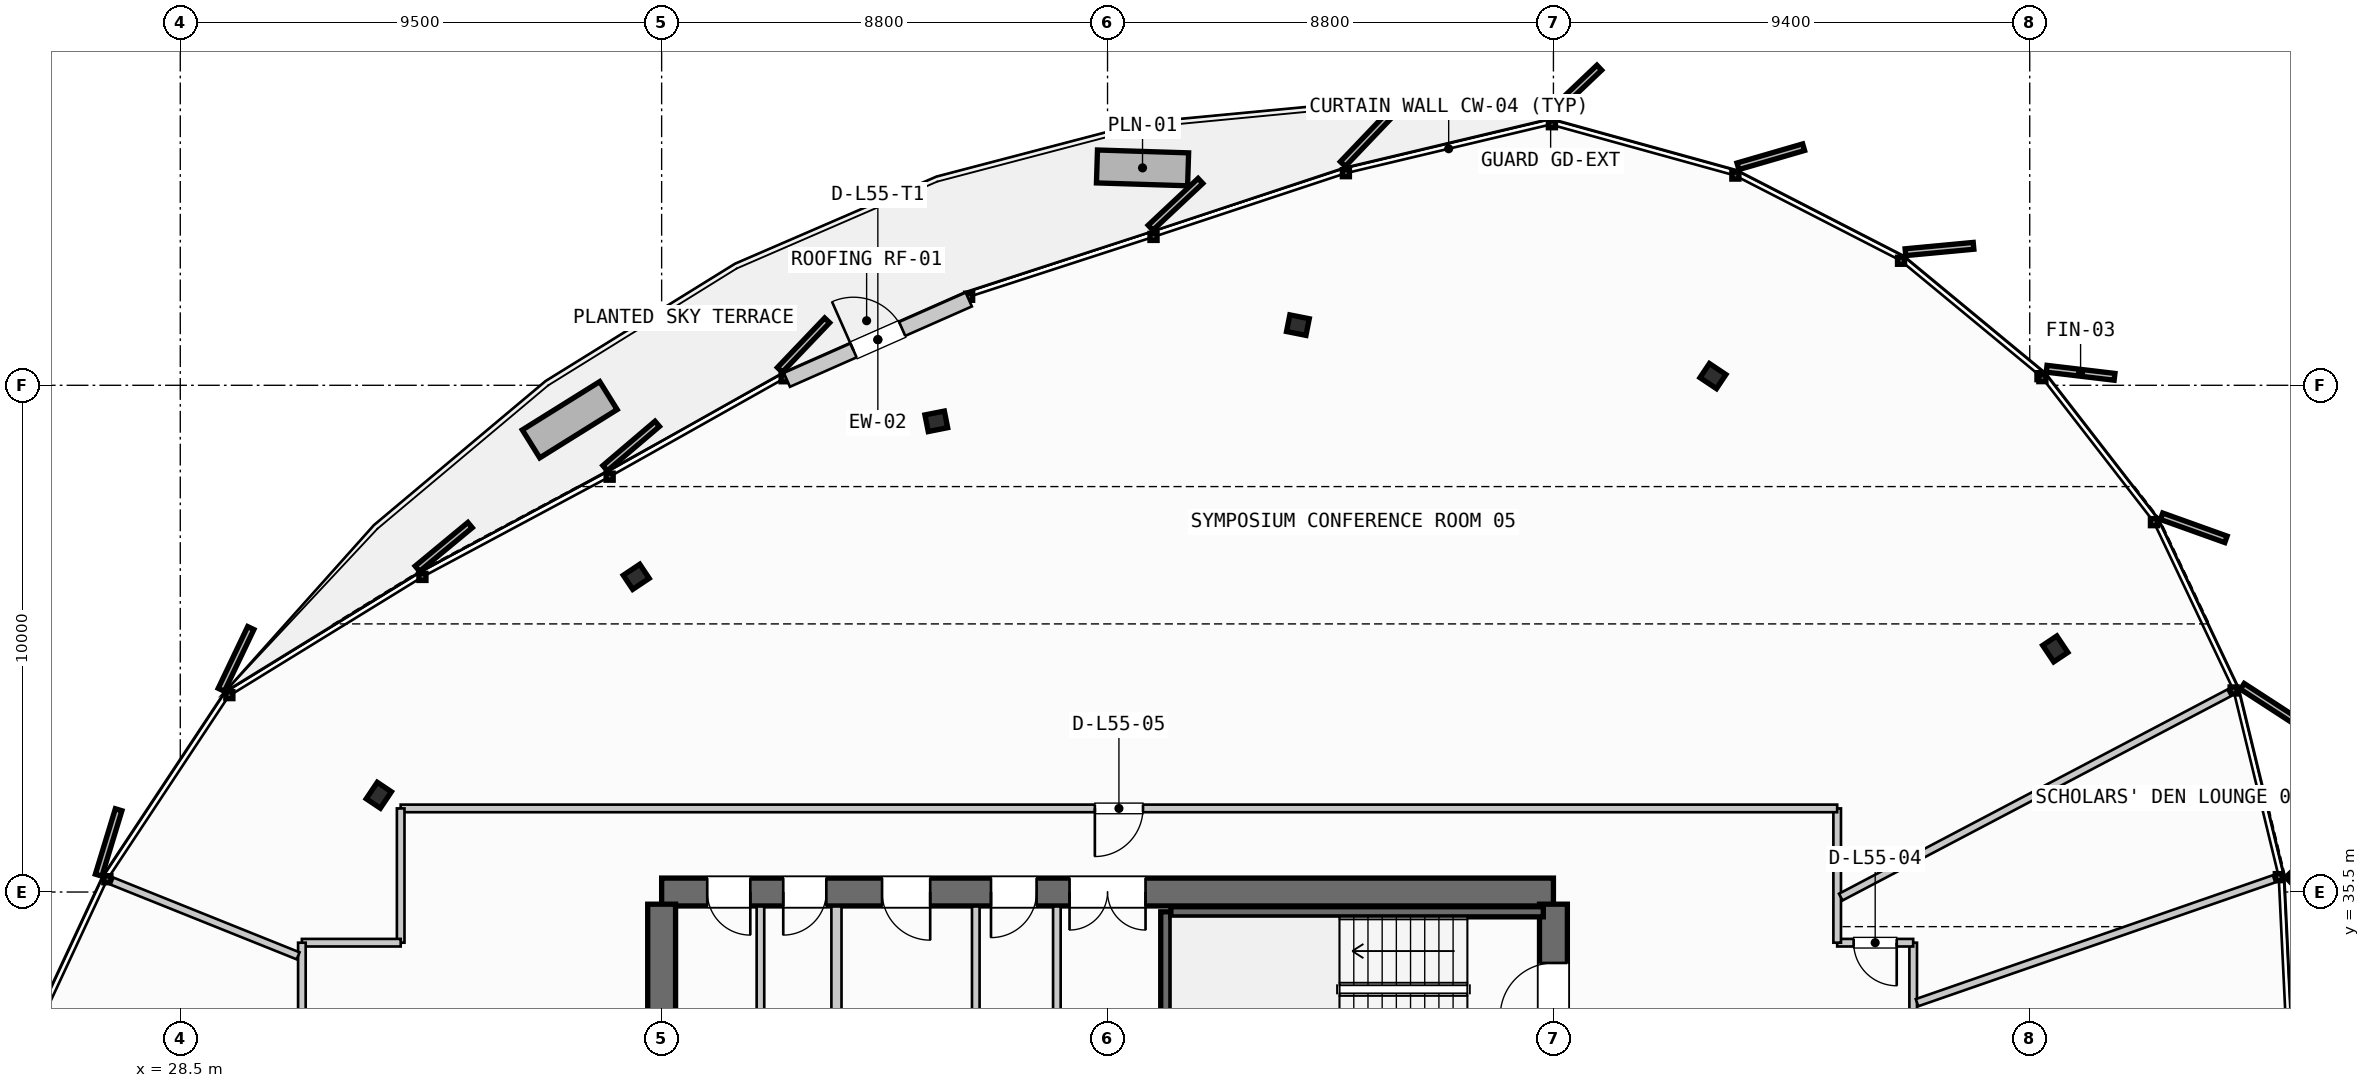
"""IFC4 building model, lengths in metres.
Left out: names, types, materials, properties, quantities, classifications, styles, units other than length and angle.
Written with IfcOpenShell. Run it as: python <this file> out.ifc"""

import sys

from ifc_helpers import new_model, si_unit, direction, frame, frame_2d, origin, origin_2d, place, context, subcontext, project, spatial, rectangle, i_section, extrude, source, transform, mapped, element, fill, save


model = new_model("IFC4")
c1 = context("Model", 3, precision=1e-05, world=origin(), true_north=direction((0.0, 1.0)))
c2 = subcontext(c1, "Body", "Model", "MODEL_VIEW")
j1 = project(units=[si_unit("LENGTHUNIT", "METRE"), si_unit("PLANEANGLEUNIT", "RADIAN")], contexts=[c1])
p1 = place(None, origin())
s1 = spatial("IfcSite", under=j1, at=p1, CompositionType="ELEMENT")
p2 = place(p1, origin())
s2 = spatial("IfcBuilding", under=s1, at=p2, CompositionType="ELEMENT")
p3 = place(p2, frame((0.0, 0.0, 211.4)))
s3 = spatial("IfcBuildingStorey", under=s2, at=p3, CompositionType="ELEMENT", Elevation=211.4)
p4 = place(p3, frame((55.6, 35.5, 0.0), z_axis=(0.0, 0.0, 1.0), x_axis=(-1.0, 0.0, 0.0)))
e1 = element("IfcWall", 1, at=p4, inside=s3, PredefinedType="SHEAR", context=c2, shape_type="SweptSolid", body=[
    extrude(rectangle(XDim=17.6, YDim=0.55, at=frame_2d((8.8, 0.0))), origin(), (0.0, 0.0, 1.0), 3.26),
])
p5 = place(p4, frame((8.05, 0.0, 0.0)))
e2 = element("IfcOpeningElement", 2, at=p5, cuts=e1, PredefinedType="OPENING", context=c2, shape_type="SweptSolid", body=[
    extrude(rectangle(XDim=1.5, YDim=2.2, at=frame_2d((0.75, 1.1))), frame((0.0, 0.285, 0.0), z_axis=(0.0, -1.0, 0.0), x_axis=(1.0, 0.0, 0.0)), (0.0, 0.0, 1.0), 0.57),
])
p6 = place(p4, frame((15.85, 0.0, 0.0)))
e3 = element("IfcOpeningElement", 3, at=p6, cuts=e1, PredefinedType="OPENING", context=c2, shape_type="SweptSolid", body=[
    extrude(rectangle(XDim=0.85, YDim=2.15, at=frame_2d((0.425, 1.075))), frame((0.0, 0.285, 0.0), z_axis=(0.0, -1.0, 0.0), x_axis=(1.0, 0.0, 0.0)), (0.0, 0.0, 1.0), 0.57),
])
p7 = place(p4, frame((14.35, 0.0, 0.0)))
e4 = element("IfcOpeningElement", 4, at=p7, cuts=e1, PredefinedType="OPENING", context=c2, shape_type="SweptSolid", body=[
    extrude(rectangle(XDim=0.85, YDim=2.15, at=frame_2d((0.425, 1.075))), frame((0.0, 0.285, 0.0), z_axis=(0.0, -1.0, 0.0), x_axis=(1.0, 0.0, 0.0)), (0.0, 0.0, 1.0), 0.57),
])
p8 = place(p4, frame((12.3, 0.0, 0.0)))
e5 = element("IfcOpeningElement", 5, at=p8, cuts=e1, PredefinedType="OPENING", context=c2, shape_type="SweptSolid", body=[
    extrude(rectangle(XDim=0.95, YDim=2.15, at=frame_2d((0.475, 1.075))), frame((0.0, 0.285, 0.0), z_axis=(0.0, -1.0, 0.0), x_axis=(1.0, 0.0, 0.0)), (0.0, 0.0, 1.0), 0.57),
])
p9 = place(p4, frame((10.2, 0.0, 0.0)))
e6 = element("IfcOpeningElement", 6, at=p9, cuts=e1, PredefinedType="OPENING", context=c2, shape_type="SweptSolid", body=[
    extrude(rectangle(XDim=0.9, YDim=2.15, at=frame_2d((0.45, 1.075))), frame((0.0, 0.285, 0.0), z_axis=(0.0, -1.0, 0.0), x_axis=(1.0, 0.0, 0.0)), (0.0, 0.0, 1.0), 0.57),
])
p10 = place(p3, frame((38.0, 35.26, 0.0), z_axis=(0.0, 0.0, 1.0), x_axis=(0.0, -1.0, 0.0)))
e7 = element("IfcWall", 7, at=p10, inside=s3, PredefinedType="SHEAR", context=c2, shape_type="SweptSolid", body=[
    extrude(rectangle(XDim=14.92, YDim=0.55, at=frame_2d((7.46, 0.0))), origin(), (0.0, 0.0, 1.0), 3.26),
])
p11 = place(p10, frame((5.21, 0.0, 0.0)))
e8 = element("IfcOpeningElement", 8, at=p11, cuts=e7, PredefinedType="OPENING", context=c2, shape_type="SweptSolid", body=[
    extrude(rectangle(XDim=1.1, YDim=2.2, at=frame_2d((0.55, 1.1))), frame((0.0, 0.285, 0.0), z_axis=(0.0, -1.0, 0.0), x_axis=(1.0, 0.0, 0.0)), (0.0, 0.0, 1.0), 0.57),
])
p12 = place(p3, frame((55.6, 20.34, 0.0), z_axis=(0.0, 0.0, 1.0), x_axis=(0.0, 1.0, 0.0)))
e9 = element("IfcWall", 9, at=p12, inside=s3, PredefinedType="SHEAR", context=c2, shape_type="SweptSolid", body=[
    extrude(rectangle(XDim=14.92, YDim=0.55, at=frame_2d((7.46, 0.0))), origin(), (0.0, 0.0, 1.0), 3.26),
])
p13 = place(p12, frame((12.71, 0.0, 0.0)))
e10 = element("IfcOpeningElement", 10, at=p13, cuts=e9, PredefinedType="OPENING", context=c2, shape_type="SweptSolid", body=[
    extrude(rectangle(XDim=1.05, YDim=2.15, at=frame_2d((0.525, 1.075))), frame((0.0, 0.285, 0.0), z_axis=(0.0, -1.0, 0.0), x_axis=(1.0, 0.0, 0.0)), (0.0, 0.0, 1.0), 0.57),
])
p14 = place(p12, frame((8.61, 0.0, 0.0)))
e11 = element("IfcOpeningElement", 11, at=p14, cuts=e9, PredefinedType="OPENING", context=c2, shape_type="SweptSolid", body=[
    extrude(rectangle(XDim=1.1, YDim=2.2, at=frame_2d((0.55, 1.1))), frame((0.0, 0.285, 0.0), z_axis=(0.0, -1.0, 0.0), x_axis=(1.0, 0.0, 0.0)), (0.0, 0.0, 1.0), 0.57),
])
m1 = source(origin(), c2, "Body", "SweptSolid", [
    extrude(i_section(OverallWidth=0.391, OverallDepth=0.335, WebThickness=0.023, FlangeThickness=0.034, FilletRadius=0.015, at=origin_2d()), origin(), (0.0, 0.0, 1.0), 3.26),
])
for number, where, z_axis, x_axis in (
    (12, (65.504, 40.298, 0.0), (0.0, 0.0, 1.0), (0.831, 0.556, 0.0)),
    (13, (58.748, 45.681, 0.0), (0.0, 0.0, 1.0), (0.556, 0.831, 0.0)),
    (14, (50.557, 46.688, 0.0), (0.0, 0.0, 1.0), (0.195, 0.981, 0.0)),
    (15, (43.421, 44.789, 0.0), (0.0, 0.0, 1.0), (-0.195, 0.981, 0.0)),
    (16, (37.499, 41.72, 0.0), (0.0, 0.0, 1.0), (-0.556, 0.831, 0.0)),
    (17, (32.418, 37.409, 0.0), (0.0, 0.0, 1.0), (-0.831, 0.556, 0.0)),
):
    element("IfcColumn", number, at=place(p3, frame(where, z_axis=z_axis, x_axis=x_axis)), inside=s3, PredefinedType="COLUMN", context=c2, shape_type="MappedRepresentation", body=[
        mapped(m1, transform((0.0, 0.0, 0.0), scale=1.0)),
    ])
p15 = place(p3, frame((40.472, 45.608, 0.0), z_axis=(0.0, 0.0, 1.0), x_axis=(0.914758259642, 0.404001641602, 0.0)))
e18 = element("IfcWall", 18, at=p15, inside=s3, PredefinedType="SOLIDWALL", context=c2, shape_type="SweptSolid", body=[
    extrude(rectangle(XDim=3.924, YDim=0.3, at=frame_2d((1.962, 0.0))), origin(), (0.0, 0.0, 1.0), 2.735),
])
p16 = place(p15, frame((1.437, 0.0, 0.0)))
e19 = element("IfcOpeningElement", 19, at=p16, cuts=e18, PredefinedType="OPENING", context=c2, shape_type="SweptSolid", body=[
    extrude(rectangle(XDim=1.05, YDim=2.2, at=frame_2d((0.525, 1.1))), frame((0.0, 0.16, 0.0), z_axis=(0.0, -1.0, 0.0), x_axis=(1.0, 0.0, 0.0)), (0.0, 0.0, 1.0), 0.32),
])
p17 = place(p3, frame((47.95, 32.05, 0.0), z_axis=(0.0, 0.0, 1.0), x_axis=(0.0, 1.0, 0.0)))
e20 = element("IfcWall", 20, at=p17, inside=s3, PredefinedType="SHEAR", context=c2, shape_type="SweptSolid", body=[
    extrude(rectangle(XDim=3.06, YDim=0.2, at=frame_2d((1.53, 0.0))), origin(), (0.0, 0.0, 1.0), 3.26),
])
p18 = place(p3, frame((48.05, 35.11, 0.0), z_axis=(0.0, 0.0, 1.0), x_axis=(1.0, 0.0, 0.0)))
e21 = element("IfcWall", 21, at=p18, inside=s3, PredefinedType="SHEAR", context=c2, shape_type="SweptSolid", body=[
    extrude(rectangle(XDim=7.35, YDim=0.2, at=frame_2d((3.675, 0.0))), origin(), (0.0, 0.0, 1.0), 3.26),
])
p19 = place(p3, frame((41.45, 31.85, 0.0), z_axis=(0.0, 0.0, 1.0), x_axis=(0.0, 1.0, 0.0)))
e22 = element("IfcWall", 22, at=p19, inside=s3, PredefinedType="PARTITIONING", context=c2, shape_type="SweptSolid", body=[
    extrude(rectangle(XDim=3.365, YDim=0.2, at=frame_2d((1.683, 0.0))), origin(), (0.0, 0.0, 1.0), 2.455),
])
for number, where, z_axis, x_axis in (
    (23, (45.8, 31.85, 0.0), (0.0, 0.0, 1.0), (0.0, 1.0, 0.0)),
    (24, (39.95, 31.85, 0.0), (0.0, 0.0, 1.0), (0.0, 1.0, 0.0)),
):
    element("IfcWall", number, at=place(p3, frame(where, z_axis=z_axis, x_axis=x_axis)), inside=s3, PredefinedType="PARTITIONING", context=c2, shape_type="SweptSolid", body=[
        extrude(rectangle(XDim=3.365, YDim=0.15, at=frame_2d((1.683, 0.0))), origin(), (0.0, 0.0, 1.0), 2.455),
    ])
p20 = place(p3, frame((44.2, 31.85, 0.0), z_axis=(0.0, 0.0, 1.0), x_axis=(0.0, 1.0, 0.0)))
e25 = element("IfcWall", 25, at=p20, inside=s3, PredefinedType="PLUMBINGWALL", context=c2, shape_type="SweptSolid", body=[
    extrude(rectangle(XDim=3.365, YDim=0.15, at=frame_2d((1.683, 0.0))), origin(), (0.0, 0.0, 1.0), 2.455),
])
p21 = place(p3, frame((62.7, 32.8, 0.0), z_axis=(0.0, 0.0, 1.0), x_axis=(0.0, 1.0, 0.0)))
e26 = element("IfcWall", 26, at=p21, inside=s3, PredefinedType="PARTITIONING", context=c2, shape_type="SweptSolid", body=[
    extrude(rectangle(XDim=1.7, YDim=0.15, at=frame_2d((0.85, 0.0))), origin(), (0.0, 0.0, 1.0), 2.455),
])
p22 = place(p3, frame((62.7, 34.5, 0.0), z_axis=(0.0, 0.0, 1.0), x_axis=(-1.0, 0.0, 0.0)))
e27 = element("IfcWall", 27, at=p22, inside=s3, PredefinedType="PARTITIONING", context=c2, shape_type="SweptSolid", body=[
    extrude(rectangle(XDim=1.5, YDim=0.15, at=frame_2d((0.75, 0.0))), origin(), (0.0, 0.0, 1.0), 2.455),
])
p23 = place(p22, frame((0.325, 0.0, 0.0)))
e28 = element("IfcOpeningElement", 28, at=p23, cuts=e27, PredefinedType="OPENING", context=c2, shape_type="SweptSolid", body=[
    extrude(rectangle(XDim=0.85, YDim=2.15, at=frame_2d((0.425, 1.075))), frame((0.0, 0.085, 0.0), z_axis=(0.0, -1.0, 0.0), x_axis=(1.0, 0.0, 0.0)), (0.0, 0.0, 1.0), 0.17),
])
p24 = place(p3, frame((61.2, 34.5, 0.0), z_axis=(0.0, 0.0, 1.0), x_axis=(0.0, 1.0, 0.0)))
e29 = element("IfcWall", 29, at=p24, inside=s3, PredefinedType="PARTITIONING", context=c2, shape_type="SweptSolid", body=[
    extrude(rectangle(XDim=2.65, YDim=0.15, at=frame_2d((1.325, 0.0))), origin(), (0.0, 0.0, 1.0), 2.455),
])
p25 = place(p3, frame((61.2, 37.15, 0.0), z_axis=(0.0, 0.0, 1.0), x_axis=(-1.0, 0.0, 0.0)))
e30 = element("IfcWall", 30, at=p25, inside=s3, PredefinedType="PARTITIONING", context=c2, shape_type="SweptSolid", body=[
    extrude(rectangle(XDim=28.35, YDim=0.15, at=frame_2d((14.175, 0.0))), origin(), (0.0, 0.0, 1.0), 2.455),
])
p26 = place(p25, frame((13.7, 0.0, 0.0)))
e31 = element("IfcOpeningElement", 31, at=p26, cuts=e30, PredefinedType="OPENING", context=c2, shape_type="SweptSolid", body=[
    extrude(rectangle(XDim=0.95, YDim=2.15, at=frame_2d((0.475, 1.075))), frame((0.0, 0.085, 0.0), z_axis=(0.0, -1.0, 0.0), x_axis=(1.0, 0.0, 0.0)), (0.0, 0.0, 1.0), 0.17),
])
p27 = place(p3, frame((32.85, 37.15, 0.0), z_axis=(0.0, 0.0, 1.0), x_axis=(0.0, -1.0, 0.0)))
e32 = element("IfcWall", 32, at=p27, inside=s3, PredefinedType="PARTITIONING", context=c2, shape_type="SweptSolid", body=[
    extrude(rectangle(XDim=2.65, YDim=0.15, at=frame_2d((1.325, 0.0))), origin(), (0.0, 0.0, 1.0), 2.455),
])
p28 = place(p3, frame((32.85, 34.5, 0.0), z_axis=(0.0, 0.0, 1.0), x_axis=(-1.0, 0.0, 0.0)))
e33 = element("IfcWall", 33, at=p28, inside=s3, PredefinedType="PARTITIONING", context=c2, shape_type="SweptSolid", body=[
    extrude(rectangle(XDim=1.95, YDim=0.15, at=frame_2d((0.975, 0.0))), origin(), (0.0, 0.0, 1.0), 2.455),
])
p29 = place(p3, frame((30.9, 34.5, 0.0), z_axis=(0.0, 0.0, 1.0), x_axis=(0.0, -1.0, 0.0)))
e34 = element("IfcWall", 34, at=p29, inside=s3, PredefinedType="PARTITIONING", context=c2, shape_type="SweptSolid", body=[
    extrude(rectangle(XDim=1.7, YDim=0.15, at=frame_2d((0.85, 0.0))), origin(), (0.0, 0.0, 1.0), 2.455),
])
p30 = place(p3, frame((62.776, 33.317, 0.0), z_axis=(0.0, 0.0, 1.0), x_axis=(0.944787019259, 0.327685044274, 0.0)))
e35 = element("IfcWall", 35, at=p30, inside=s3, PredefinedType="PARTITIONING", context=c2, shape_type="SweptSolid", body=[
    extrude(rectangle(XDim=7.458, YDim=0.15, at=frame_2d((3.729, 0.0))), origin(), (0.0, 0.0, 1.0), 2.455),
])
p31 = place(p3, frame((61.271, 35.4, 0.0), z_axis=(0.0, 0.0, 1.0), x_axis=(0.885089383212, 0.465421082168, 0.0)))
e36 = element("IfcWall", 36, at=p31, inside=s3, PredefinedType="PARTITIONING", context=c2, shape_type="SweptSolid", body=[
    extrude(rectangle(XDim=8.66, YDim=0.15, at=frame_2d((4.33, 0.0))), origin(), (0.0, 0.0, 1.0), 2.455),
])
p32 = place(p3, frame((30.826, 34.241, 0.0), z_axis=(0.0, 0.0, 1.0), x_axis=(-0.927965194186, 0.372666873197, 0.0)))
e37 = element("IfcWall", 37, at=p32, inside=s3, PredefinedType="PARTITIONING", context=c2, shape_type="SweptSolid", body=[
    extrude(rectangle(XDim=3.957, YDim=0.15, at=frame_2d((1.979, 0.0))), origin(), (0.0, 0.0, 1.0), 2.455),
])
m2 = source(origin(), c2, "Body", "SweptSolid", [
    extrude(rectangle(XDim=1.05, YDim=2.2, at=frame_2d((0.525, 1.1))), frame((0.0, 0.025, 0.0), z_axis=(0.0, -1.0, 0.0), x_axis=(1.0, 0.0, 0.0)), (0.0, 0.0, 1.0), 0.05),
])
p33 = place(p16, origin())
e38 = element("IfcDoor", 38, at=p33, inside=s3, OperationType="SINGLE_SWING_LEFT", PredefinedType="DOOR", context=c2, shape_type="MappedRepresentation", body=[
    mapped(m2, transform((0.0, 0.0, 0.0), scale=1.0)),
])
fill(e19, e38)
m3 = source(origin(), c2, "Body", "SweptSolid", [
    extrude(rectangle(XDim=1.05, YDim=2.15, at=frame_2d((0.525, 1.075))), frame((0.0, 0.025, 0.0), z_axis=(0.0, -1.0, 0.0), x_axis=(1.0, 0.0, 0.0)), (0.0, 0.0, 1.0), 0.05),
])
p34 = place(p13, origin())
e39 = element("IfcDoor", 39, at=p34, inside=s3, OperationType="SINGLE_SWING_LEFT", PredefinedType="DOOR", context=c2, shape_type="MappedRepresentation", body=[
    mapped(m3, transform((0.0, 0.0, 0.0), scale=1.0)),
])
fill(e10, e39)
m4 = source(origin(), c2, "Body", "SweptSolid", [
    extrude(rectangle(XDim=1.5, YDim=2.2, at=frame_2d((0.75, 1.1))), frame((0.0, 0.025, 0.0), z_axis=(0.0, -1.0, 0.0), x_axis=(1.0, 0.0, 0.0)), (0.0, 0.0, 1.0), 0.05),
])
p35 = place(p5, origin())
e40 = element("IfcDoor", 40, at=p35, inside=s3, OperationType="DOUBLE_DOOR_SINGLE_SWING", PredefinedType="DOOR", context=c2, shape_type="MappedRepresentation", body=[
    mapped(m4, transform((0.0, 0.0, 0.0), scale=1.0)),
])
fill(e2, e40)
m5 = source(origin(), c2, "Body", "SweptSolid", [
    extrude(rectangle(XDim=0.85, YDim=2.15, at=frame_2d((0.425, 1.075))), frame((0.0, 0.025, 0.0), z_axis=(0.0, -1.0, 0.0), x_axis=(1.0, 0.0, 0.0)), (0.0, 0.0, 1.0), 0.05),
])
p36 = place(p6, origin())
e41 = element("IfcDoor", 41, at=p36, inside=s3, OperationType="SINGLE_SWING_LEFT", PredefinedType="DOOR", context=c2, shape_type="MappedRepresentation", body=[
    mapped(m5, transform((0.0, 0.0, 0.0), scale=1.0)),
])
fill(e3, e41)
p37 = place(p7, origin())
e42 = element("IfcDoor", 42, at=p37, inside=s3, OperationType="SINGLE_SWING_RIGHT", PredefinedType="DOOR", context=c2, shape_type="MappedRepresentation", body=[
    mapped(m5, transform((0.0, 0.0, 0.0), scale=1.0)),
])
fill(e4, e42)
m6 = source(origin(), c2, "Body", "SweptSolid", [
    extrude(rectangle(XDim=0.95, YDim=2.15, at=frame_2d((0.475, 1.075))), frame((0.0, 0.025, 0.0), z_axis=(0.0, -1.0, 0.0), x_axis=(1.0, 0.0, 0.0)), (0.0, 0.0, 1.0), 0.05),
])
p38 = place(p8, origin())
e43 = element("IfcDoor", 43, at=p38, inside=s3, OperationType="SINGLE_SWING_LEFT", PredefinedType="DOOR", context=c2, shape_type="MappedRepresentation", body=[
    mapped(m6, transform((0.0, 0.0, 0.0), scale=1.0)),
])
fill(e5, e43)
m7 = source(origin(), c2, "Body", "SweptSolid", [
    extrude(rectangle(XDim=0.9, YDim=2.15, at=frame_2d((0.45, 1.075))), frame((0.0, 0.025, 0.0), z_axis=(0.0, -1.0, 0.0), x_axis=(1.0, 0.0, 0.0)), (0.0, 0.0, 1.0), 0.05),
])
p39 = place(p9, origin())
e44 = element("IfcDoor", 44, at=p39, inside=s3, OperationType="SINGLE_SWING_RIGHT", PredefinedType="DOOR", context=c2, shape_type="MappedRepresentation", body=[
    mapped(m7, transform((0.0, 0.0, 0.0), scale=1.0)),
])
fill(e6, e44)
p40 = place(p23, origin())
e45 = element("IfcDoor", 45, at=p40, inside=s3, OperationType="SINGLE_SWING_LEFT", PredefinedType="DOOR", context=c2, shape_type="MappedRepresentation", body=[
    mapped(m5, transform((0.0, 0.0, 0.0), scale=1.0)),
])
fill(e28, e45)
p41 = place(p26, origin())
e46 = element("IfcDoor", 46, at=p41, inside=s3, OperationType="SINGLE_SWING_RIGHT", PredefinedType="DOOR", context=c2, shape_type="MappedRepresentation", body=[
    mapped(m6, transform((0.0, 0.0, 0.0), scale=1.0)),
])
fill(e31, e46)
save(model, sys.argv[1])
